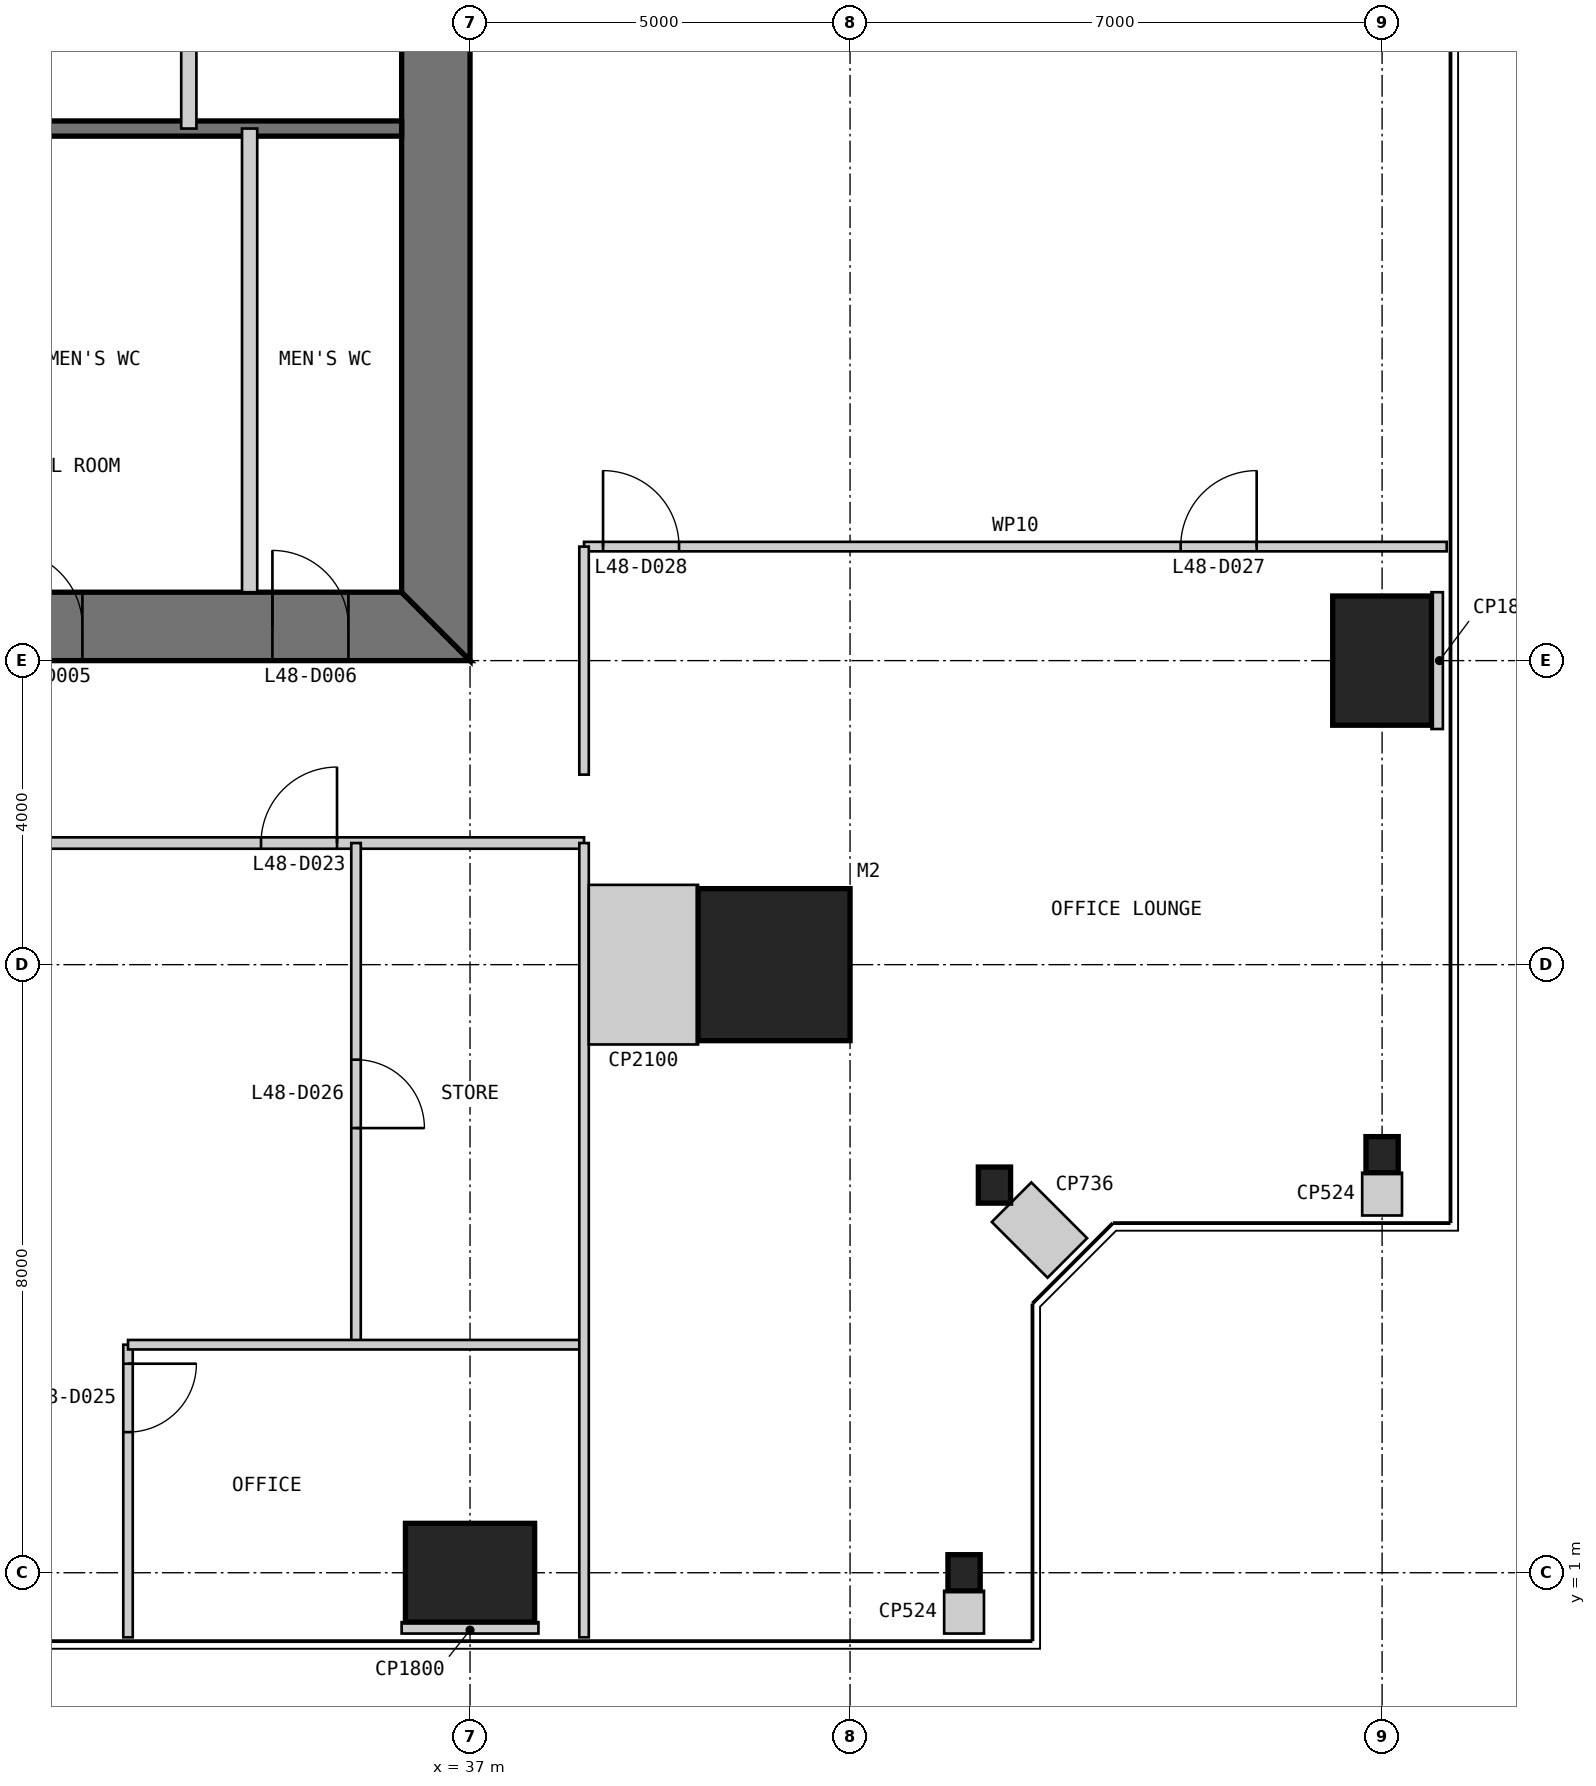
"""IFC4 building model, lengths in metres.
Left out: names, types, materials, properties, quantities, classifications, styles, units other than length and angle.
Written with IfcOpenShell. Run it as: python <this file> out.ifc"""

import sys

from ifc_helpers import new_model, si_unit, direction, frame, frame_2d, origin, origin_2d, place, context, subcontext, project, spatial, polyline, rectangle, i_section, outline, extrude, element, fill, save


model = new_model("IFC4")
c1 = context("Model", 3, precision=1e-05, world=origin(), true_north=direction((0.0, 1.0)))
c2 = subcontext(c1, "Body", "Model", "MODEL_VIEW")
j1 = project(units=[si_unit("LENGTHUNIT", "METRE"), si_unit("PLANEANGLEUNIT", "RADIAN")], contexts=[c1])
p1 = place(None, origin())
s1 = spatial("IfcSite", under=j1, at=p1, CompositionType="ELEMENT")
p2 = place(p1, origin())
s2 = spatial("IfcBuilding", under=s1, at=p2, CompositionType="ELEMENT")
p3 = place(p2, frame((0.0, 0.0, 205.8)))
s3 = spatial("IfcBuildingStorey", under=s2, at=p3, CompositionType="ELEMENT", Elevation=205.8)
p4 = place(p3, frame((41.0, 9.0, 0.0), z_axis=(0.0, 0.0, 1.0), x_axis=(1.0, 0.0, 0.0)))
e1 = element("IfcColumn", 1, at=p4, inside=s3, PredefinedType="COLUMN", context=c2, shape_type="SweptSolid", body=[
    extrude(rectangle(XDim=2.0, YDim=2.0, at=origin_2d()), origin(), (0.0, 0.0, 1.0), 4.0),
])
p5 = place(p3, frame((37.0, 1.0, 0.0), z_axis=(0.0, 0.0, 1.0), x_axis=(1.0, 0.0, 0.0)))
e2 = element("IfcColumn", 2, at=p5, inside=s3, PredefinedType="COLUMN", context=c2, shape_type="SweptSolid", body=[
    extrude(rectangle(XDim=1.7, YDim=1.3, at=origin_2d()), origin(), (0.0, 0.0, 1.0), 4.0),
])
for number, where, z_axis, x_axis in (
    (3, (43.5, 1.0, 0.0), (0.0, 0.0, 1.0), (1.0, 0.0, 0.0)),
    (4, (43.9, 6.1, 0.0), (0.0, 0.0, 1.0), (1.0, 0.0, 0.0)),
    (5, (49.0, 6.5, 0.0), (0.0, 0.0, 1.0), (1.0, 0.0, 0.0)),
):
    element("IfcColumn", number, at=place(p3, frame(where, z_axis=z_axis, x_axis=x_axis)), inside=s3, PredefinedType="COLUMN", context=c2, shape_type="SweptSolid", body=[
        extrude(i_section(OverallWidth=0.424, OverallDepth=0.475, WebThickness=0.048, FlangeThickness=0.077, at=origin_2d()), origin(), (0.0, 0.0, 1.0), 4.0),
    ])
p6 = place(p3, frame((49.0, 13.0, 0.0), z_axis=(0.0, 0.0, 1.0), x_axis=(1.0, 0.0, 0.0)))
e6 = element("IfcColumn", 6, at=p6, inside=s3, PredefinedType="COLUMN", context=c2, shape_type="SweptSolid", body=[
    extrude(rectangle(XDim=1.3, YDim=1.7, at=origin_2d()), origin(), (0.0, 0.0, 1.0), 4.0),
])
p7 = place(p3, frame((13.0, 13.45, 0.0), z_axis=(0.0, 0.0, 1.0), x_axis=(1.0, 0.0, 0.0)))
e7 = element("IfcWall", 7, at=p7, inside=s3, PredefinedType="SHEAR", context=c2, shape_type="SweptSolid", body=[
    extrude(outline(polyline([(0.0, -0.45), (24.0, -0.45), (23.1, 0.45), (0.9, 0.45), (0.0, -0.45)])), origin(), (0.0, 0.0, 1.0), 4.0),
])
p8 = place(p7, frame((4.9, 0.0, 0.0)))
e8 = element("IfcOpeningElement", 8, at=p8, cuts=e7, PredefinedType="OPENING", context=c2, shape_type="SweptSolid", body=[
    extrude(rectangle(XDim=1.0, YDim=2.2, at=frame_2d((0.5, 1.1))), frame((0.0, 0.46, 0.0), z_axis=(0.0, -1.0, 0.0), x_axis=(1.0, 0.0, 0.0)), (0.0, 0.0, 1.0), 0.92),
])
p9 = place(p7, frame((8.9, 0.0, 0.0)))
e9 = element("IfcOpeningElement", 9, at=p9, cuts=e7, PredefinedType="OPENING", context=c2, shape_type="SweptSolid", body=[
    extrude(rectangle(XDim=1.1, YDim=2.2, at=frame_2d((0.55, 1.1))), frame((0.0, 0.46, 0.0), z_axis=(0.0, -1.0, 0.0), x_axis=(1.0, 0.0, 0.0)), (0.0, 0.0, 1.0), 0.92),
])
p10 = place(p7, frame((15.05, 0.0, 0.0)))
e10 = element("IfcOpeningElement", 10, at=p10, cuts=e7, PredefinedType="OPENING", context=c2, shape_type="SweptSolid", body=[
    extrude(rectangle(XDim=0.9, YDim=2.2, at=frame_2d((0.45, 1.1))), frame((0.0, 0.46, 0.0), z_axis=(0.0, -1.0, 0.0), x_axis=(1.0, 0.0, 0.0)), (0.0, 0.0, 1.0), 0.92),
])
p11 = place(p7, frame((17.9, 0.0, 0.0)))
e11 = element("IfcOpeningElement", 11, at=p11, cuts=e7, PredefinedType="OPENING", context=c2, shape_type="SweptSolid", body=[
    extrude(rectangle(XDim=1.0, YDim=2.2, at=frame_2d((0.5, 1.1))), frame((0.0, 0.46, 0.0), z_axis=(0.0, -1.0, 0.0), x_axis=(1.0, 0.0, 0.0)), (0.0, 0.0, 1.0), 0.92),
])
p12 = place(p7, frame((21.4, 0.0, 0.0)))
e12 = element("IfcOpeningElement", 12, at=p12, cuts=e7, PredefinedType="OPENING", context=c2, shape_type="SweptSolid", body=[
    extrude(rectangle(XDim=1.0, YDim=2.2, at=frame_2d((0.5, 1.1))), frame((0.0, 0.46, 0.0), z_axis=(0.0, -1.0, 0.0), x_axis=(1.0, 0.0, 0.0)), (0.0, 0.0, 1.0), 0.92),
])
p13 = place(p3, frame((36.55, 13.9, 0.0), z_axis=(0.0, 0.0, 1.0), x_axis=(0.0, 1.0, 0.0)))
e13 = element("IfcWall", 13, at=p13, inside=s3, PredefinedType="SHEAR", context=c2, shape_type="SweptSolid", body=[
    extrude(outline(polyline([(-0.9, -0.45), (23.1, -0.45), (22.2, 0.45), (0.0, 0.45), (-0.9, -0.45)])), origin(), (0.0, 0.0, 1.0), 4.0),
])
p14 = place(p13, frame((20.2, 0.0, 0.0)))
e14 = element("IfcOpeningElement", 14, at=p14, cuts=e13, PredefinedType="OPENING", context=c2, shape_type="SweptSolid", body=[
    extrude(rectangle(XDim=1.0, YDim=2.2, at=frame_2d((0.5, 1.1))), frame((0.0, 0.46, 0.0), z_axis=(0.0, -1.0, 0.0), x_axis=(1.0, 0.0, 0.0)), (0.0, 0.0, 1.0), 0.92),
])
p15 = place(p13, frame((17.25, 0.0, 0.0)))
e15 = element("IfcOpeningElement", 15, at=p15, cuts=e13, PredefinedType="OPENING", context=c2, shape_type="SweptSolid", body=[
    extrude(rectangle(XDim=0.9, YDim=2.2, at=frame_2d((0.45, 1.1))), frame((0.0, 0.46, 0.0), z_axis=(0.0, -1.0, 0.0), x_axis=(1.0, 0.0, 0.0)), (0.0, 0.0, 1.0), 0.92),
])
p16 = place(p3, frame((20.3, 20.0, 0.0), z_axis=(0.0, 0.0, 1.0), x_axis=(1.0, 0.0, 0.0)))
e16 = element("IfcWall", 16, at=p16, inside=s3, PredefinedType="SOLIDWALL", context=c2, shape_type="SweptSolid", body=[
    extrude(rectangle(XDim=15.8, YDim=0.2, at=frame_2d((7.9, 0.0))), origin(), (0.0, 0.0, 1.0), 3.8),
])
p17 = place(p3, frame((34.1, 13.9, 0.0), z_axis=(0.0, 0.0, 1.0), x_axis=(0.0, 1.0, 0.0)))
e17 = element("IfcWall", 17, at=p17, inside=s3, PredefinedType="PARTITIONING", context=c2, shape_type="SweptSolid", body=[
    extrude(rectangle(XDim=6.1, YDim=0.2, at=frame_2d((3.05, 0.0))), origin(), (0.0, 0.0, 1.0), 3.8),
])
p18 = place(p3, frame((33.3, 36.1, 0.0), z_axis=(0.0, 0.0, 1.0), x_axis=(0.0, -1.0, 0.0)))
e18 = element("IfcWall", 18, at=p18, inside=s3, PredefinedType="PARTITIONING", context=c2, shape_type="SweptSolid", body=[
    extrude(rectangle(XDim=16.1, YDim=0.2, at=frame_2d((8.05, 0.0))), origin(), (0.0, 0.0, 1.0), 3.8),
])
p19 = place(p18, frame((4.4, 0.0, 0.0)))
e19 = element("IfcOpeningElement", 19, at=p19, cuts=e18, PredefinedType="OPENING", context=c2, shape_type="SweptSolid", body=[
    extrude(rectangle(XDim=0.9, YDim=2.2, at=frame_2d((0.45, 1.1))), frame((0.0, 0.11, 0.0), z_axis=(0.0, -1.0, 0.0), x_axis=(1.0, 0.0, 0.0)), (0.0, 0.0, 1.0), 0.22),
])
p20 = place(p3, frame((11.5, 10.6, 0.0), z_axis=(0.0, 0.0, 1.0), x_axis=(1.0, 0.0, 0.0)))
e20 = element("IfcWall", 20, at=p20, inside=s3, PredefinedType="PARTITIONING", context=c2, shape_type="SweptSolid", body=[
    extrude(rectangle(XDim=27.0, YDim=0.15, at=frame_2d((13.5, 0.0))), origin(), (0.0, 0.0, 1.0), 3.85),
])
p21 = place(p20, frame((0.25, 0.0, 0.0)))
e21 = element("IfcOpeningElement", 21, at=p21, cuts=e20, PredefinedType="OPENING", context=c2, shape_type="SweptSolid", body=[
    extrude(rectangle(XDim=1.0, YDim=2.2, at=frame_2d((0.5, 1.1))), frame((0.0, 0.085, 0.0), z_axis=(0.0, -1.0, 0.0), x_axis=(1.0, 0.0, 0.0)), (0.0, 0.0, 1.0), 0.17),
])
p22 = place(p20, frame((22.75, 0.0, 0.0)))
e22 = element("IfcOpeningElement", 22, at=p22, cuts=e20, PredefinedType="OPENING", context=c2, shape_type="SweptSolid", body=[
    extrude(rectangle(XDim=1.0, YDim=2.2, at=frame_2d((0.5, 1.1))), frame((0.0, 0.085, 0.0), z_axis=(0.0, -1.0, 0.0), x_axis=(1.0, 0.0, 0.0)), (0.0, 0.0, 1.0), 0.17),
])
p23 = place(p3, frame((32.5, 0.15, 0.0), z_axis=(0.0, 0.0, 1.0), x_axis=(0.0, 1.0, 0.0)))
e23 = element("IfcWall", 23, at=p23, inside=s3, PredefinedType="PARTITIONING", context=c2, shape_type="SweptSolid", body=[
    extrude(rectangle(XDim=3.85, YDim=0.125, at=frame_2d((1.925, 0.0))), origin(), (0.0, 0.0, 1.0), 3.85),
])
p24 = place(p23, frame((2.7, 0.0, 0.0)))
e24 = element("IfcOpeningElement", 24, at=p24, cuts=e23, PredefinedType="OPENING", context=c2, shape_type="SweptSolid", body=[
    extrude(rectangle(XDim=0.9, YDim=2.2, at=frame_2d((0.45, 1.1))), frame((0.0, 0.073, 0.0), z_axis=(0.0, -1.0, 0.0), x_axis=(1.0, 0.0, 0.0)), (0.0, 0.0, 1.0), 0.145),
])
p25 = place(p3, frame((35.5, 4.0, 0.0), z_axis=(0.0, 0.0, 1.0), x_axis=(0.0, 1.0, 0.0)))
e25 = element("IfcWall", 25, at=p25, inside=s3, PredefinedType="PARTITIONING", context=c2, shape_type="SweptSolid", body=[
    extrude(rectangle(XDim=6.6, YDim=0.125, at=frame_2d((3.3, 0.0))), origin(), (0.0, 0.0, 1.0), 3.85),
])
p26 = place(p25, frame((2.85, 0.0, 0.0)))
e26 = element("IfcOpeningElement", 26, at=p26, cuts=e25, PredefinedType="OPENING", context=c2, shape_type="SweptSolid", body=[
    extrude(rectangle(XDim=0.9, YDim=2.2, at=frame_2d((0.45, 1.1))), frame((0.0, 0.073, 0.0), z_axis=(0.0, -1.0, 0.0), x_axis=(1.0, 0.0, 0.0)), (0.0, 0.0, 1.0), 0.145),
])
p27 = place(p3, frame((32.5, 4.0, 0.0), z_axis=(0.0, 0.0, 1.0), x_axis=(1.0, 0.0, 0.0)))
e27 = element("IfcWall", 27, at=p27, inside=s3, PredefinedType="PARTITIONING", context=c2, shape_type="SweptSolid", body=[
    extrude(rectangle(XDim=6.0, YDim=0.125, at=frame_2d((3.0, 0.0))), origin(), (0.0, 0.0, 1.0), 3.85),
])
p28 = place(p3, frame((38.5, 0.15, 0.0), z_axis=(0.0, 0.0, 1.0), x_axis=(0.0, 1.0, 0.0)))
e28 = element("IfcWall", 28, at=p28, inside=s3, PredefinedType="PARTITIONING", context=c2, shape_type="SweptSolid", body=[
    extrude(rectangle(XDim=10.45, YDim=0.125, at=frame_2d((5.225, 0.0))), origin(), (0.0, 0.0, 1.0), 3.85),
])
p29 = place(p3, frame((49.85, 14.5, 0.0), z_axis=(0.0, 0.0, 1.0), x_axis=(-1.0, 0.0, 0.0)))
e29 = element("IfcWall", 29, at=p29, inside=s3, PredefinedType="PARTITIONING", context=c2, shape_type="SweptSolid", body=[
    extrude(rectangle(XDim=11.35, YDim=0.125, at=frame_2d((5.675, 0.0))), origin(), (0.0, 0.0, 1.0), 3.85),
])
p30 = place(p29, frame((2.5, 0.0, 0.0)))
e30 = element("IfcOpeningElement", 30, at=p30, cuts=e29, PredefinedType="OPENING", context=c2, shape_type="SweptSolid", body=[
    extrude(rectangle(XDim=1.0, YDim=2.2, at=frame_2d((0.5, 1.1))), frame((0.0, 0.073, 0.0), z_axis=(0.0, -1.0, 0.0), x_axis=(1.0, 0.0, 0.0)), (0.0, 0.0, 1.0), 0.145),
])
p31 = place(p29, frame((10.1, 0.0, 0.0)))
e31 = element("IfcOpeningElement", 31, at=p31, cuts=e29, PredefinedType="OPENING", context=c2, shape_type="SweptSolid", body=[
    extrude(rectangle(XDim=1.0, YDim=2.2, at=frame_2d((0.5, 1.1))), frame((0.0, 0.073, 0.0), z_axis=(0.0, -1.0, 0.0), x_axis=(1.0, 0.0, 0.0)), (0.0, 0.0, 1.0), 0.145),
])
p32 = place(p3, frame((38.5, 11.5, 0.0), z_axis=(0.0, 0.0, 1.0), x_axis=(0.0, 1.0, 0.0)))
e32 = element("IfcWall", 32, at=p32, inside=s3, PredefinedType="PARTITIONING", context=c2, shape_type="SweptSolid", body=[
    extrude(rectangle(XDim=3.0, YDim=0.125, at=frame_2d((1.5, 0.0))), origin(), (0.0, 0.0, 1.0), 3.85),
])
p33 = place(p3, frame((37.0, 0.2, 0.0), z_axis=(0.0, 0.0, 1.0), x_axis=(0.0, 1.0, 0.0)))
e33 = element("IfcWall", 33, at=p33, inside=s3, PredefinedType="PARTITIONING", context=c2, shape_type="SweptSolid", body=[
    extrude(rectangle(XDim=0.15, YDim=1.8, at=frame_2d((0.075, 0.0))), origin(), (0.0, 0.0, 1.0), 3.85),
])
p34 = place(p3, frame((38.562, 9.0, 0.0), z_axis=(0.0, 0.0, 1.0), x_axis=(1.0, 0.0, 0.0)))
e34 = element("IfcWall", 34, at=p34, inside=s3, PredefinedType="PARTITIONING", context=c2, shape_type="SweptSolid", body=[
    extrude(rectangle(XDim=1.438, YDim=2.1, at=frame_2d((0.719, 0.0))), origin(), (0.0, 0.0, 1.0), 3.85),
])
p35 = place(p3, frame((43.5, 0.2, 0.0), z_axis=(0.0, 0.0, 1.0), x_axis=(0.0, 1.0, 0.0)))
e35 = element("IfcWall", 35, at=p35, inside=s3, PredefinedType="PARTITIONING", context=c2, shape_type="SweptSolid", body=[
    extrude(rectangle(XDim=0.562, YDim=0.524, at=frame_2d((0.281, 0.0))), origin(), (0.0, 0.0, 1.0), 3.85),
])
p36 = place(p3, frame((44.859, 5.141, 0.0), z_axis=(0.0, 0.0, 1.0), x_axis=(-0.707106781187, 0.707106781187, 0.0)))
e36 = element("IfcWall", 36, at=p36, inside=s3, PredefinedType="PARTITIONING", context=c2, shape_type="SweptSolid", body=[
    extrude(rectangle(XDim=1.038, YDim=0.736, at=frame_2d((0.519, 0.0))), origin(), (0.0, 0.0, 1.0), 3.85),
])
p37 = place(p3, frame((49.0, 5.7, 0.0), z_axis=(0.0, 0.0, 1.0), x_axis=(0.0, 1.0, 0.0)))
e37 = element("IfcWall", 37, at=p37, inside=s3, PredefinedType="PARTITIONING", context=c2, shape_type="SweptSolid", body=[
    extrude(rectangle(XDim=0.562, YDim=0.524, at=frame_2d((0.281, 0.0))), origin(), (0.0, 0.0, 1.0), 3.85),
])
p38 = place(p3, frame((49.8, 13.0, 0.0), z_axis=(0.0, 0.0, 1.0), x_axis=(-1.0, 0.0, 0.0)))
e38 = element("IfcWall", 38, at=p38, inside=s3, PredefinedType="PARTITIONING", context=c2, shape_type="SweptSolid", body=[
    extrude(rectangle(XDim=0.15, YDim=1.8, at=frame_2d((0.075, 0.0))), origin(), (0.0, 0.0, 1.0), 3.85),
])
p39 = place(p11, origin())
e39 = element("IfcDoor", 39, at=p39, inside=s3, OperationType="SINGLE_SWING_LEFT", PredefinedType="DOOR", context=c2, shape_type="SweptSolid", body=[
    extrude(rectangle(XDim=1.0, YDim=2.2, at=frame_2d((0.5, 1.1))), frame((0.0, 0.025, 0.0), z_axis=(0.0, -1.0, 0.0), x_axis=(1.0, 0.0, 0.0)), (0.0, 0.0, 1.0), 0.05),
    extrude(outline(polyline([(0.0, 0.0), (0.04, 0.0), (0.04, 2.16), (0.96, 2.16), (0.96, 0.0), (1.0, 0.0), (1.0, 2.2), (0.0, 2.2), (0.0, 0.0)])), frame((0.0, 0.3, 0.0), z_axis=(0.0, -1.0, 0.0), x_axis=(1.0, 0.0, 0.0)), (0.0, 0.0, 1.0), 0.6),
])
fill(e11, e39)
p40 = place(p12, origin())
e40 = element("IfcDoor", 40, at=p40, inside=s3, OperationType="SINGLE_SWING_LEFT", PredefinedType="DOOR", context=c2, shape_type="SweptSolid", body=[
    extrude(rectangle(XDim=1.0, YDim=2.2, at=frame_2d((0.5, 1.1))), frame((0.0, 0.025, 0.0), z_axis=(0.0, -1.0, 0.0), x_axis=(1.0, 0.0, 0.0)), (0.0, 0.0, 1.0), 0.05),
    extrude(outline(polyline([(0.0, 0.0), (0.04, 0.0), (0.04, 2.16), (0.96, 2.16), (0.96, 0.0), (1.0, 0.0), (1.0, 2.2), (0.0, 2.2), (0.0, 0.0)])), frame((0.0, 0.3, 0.0), z_axis=(0.0, -1.0, 0.0), x_axis=(1.0, 0.0, 0.0)), (0.0, 0.0, 1.0), 0.6),
])
fill(e12, e40)
p41 = place(p22, origin())
e41 = element("IfcDoor", 41, at=p41, inside=s3, OperationType="SINGLE_SWING_RIGHT", PredefinedType="DOOR", context=c2, shape_type="SweptSolid", body=[
    extrude(rectangle(XDim=1.0, YDim=2.2, at=frame_2d((0.5, 1.1))), frame((0.0, 0.025, 0.0), z_axis=(0.0, -1.0, 0.0), x_axis=(1.0, 0.0, 0.0)), (0.0, 0.0, 1.0), 0.05),
])
fill(e22, e41)
p42 = place(p24, frame((0.9, 0.0, 0.0), z_axis=(0.0, 0.0, 1.0), x_axis=(-1.0, 0.0, 0.0)))
e42 = element("IfcDoor", 42, at=p42, inside=s3, OperationType="SINGLE_SWING_LEFT", PredefinedType="DOOR", context=c2, shape_type="SweptSolid", body=[
    extrude(rectangle(XDim=0.9, YDim=2.2, at=frame_2d((0.45, 1.1))), frame((0.0, 0.025, 0.0), z_axis=(0.0, -1.0, 0.0), x_axis=(1.0, 0.0, 0.0)), (0.0, 0.0, 1.0), 0.05),
])
fill(e24, e42)
p43 = place(p26, frame((0.9, 0.0, 0.0), z_axis=(0.0, 0.0, 1.0), x_axis=(-1.0, 0.0, 0.0)))
e43 = element("IfcDoor", 43, at=p43, inside=s3, OperationType="SINGLE_SWING_RIGHT", PredefinedType="DOOR", context=c2, shape_type="SweptSolid", body=[
    extrude(rectangle(XDim=0.9, YDim=2.2, at=frame_2d((0.45, 1.1))), frame((0.0, 0.025, 0.0), z_axis=(0.0, -1.0, 0.0), x_axis=(1.0, 0.0, 0.0)), (0.0, 0.0, 1.0), 0.05),
])
fill(e26, e43)
p44 = place(p30, frame((1.0, 0.0, 0.0), z_axis=(0.0, 0.0, 1.0), x_axis=(-1.0, 0.0, 0.0)))
e44 = element("IfcDoor", 44, at=p44, inside=s3, OperationType="SINGLE_SWING_RIGHT", PredefinedType="DOOR", context=c2, shape_type="SweptSolid", body=[
    extrude(rectangle(XDim=1.0, YDim=2.2, at=frame_2d((0.5, 1.1))), frame((0.0, 0.025, 0.0), z_axis=(0.0, -1.0, 0.0), x_axis=(1.0, 0.0, 0.0)), (0.0, 0.0, 1.0), 0.05),
])
fill(e30, e44)
p45 = place(p31, frame((1.0, 0.0, 0.0), z_axis=(0.0, 0.0, 1.0), x_axis=(-1.0, 0.0, 0.0)))
e45 = element("IfcDoor", 45, at=p45, inside=s3, OperationType="SINGLE_SWING_LEFT", PredefinedType="DOOR", context=c2, shape_type="SweptSolid", body=[
    extrude(rectangle(XDim=1.0, YDim=2.2, at=frame_2d((0.5, 1.1))), frame((0.0, 0.025, 0.0), z_axis=(0.0, -1.0, 0.0), x_axis=(1.0, 0.0, 0.0)), (0.0, 0.0, 1.0), 0.05),
])
fill(e31, e45)
save(model, sys.argv[1])
